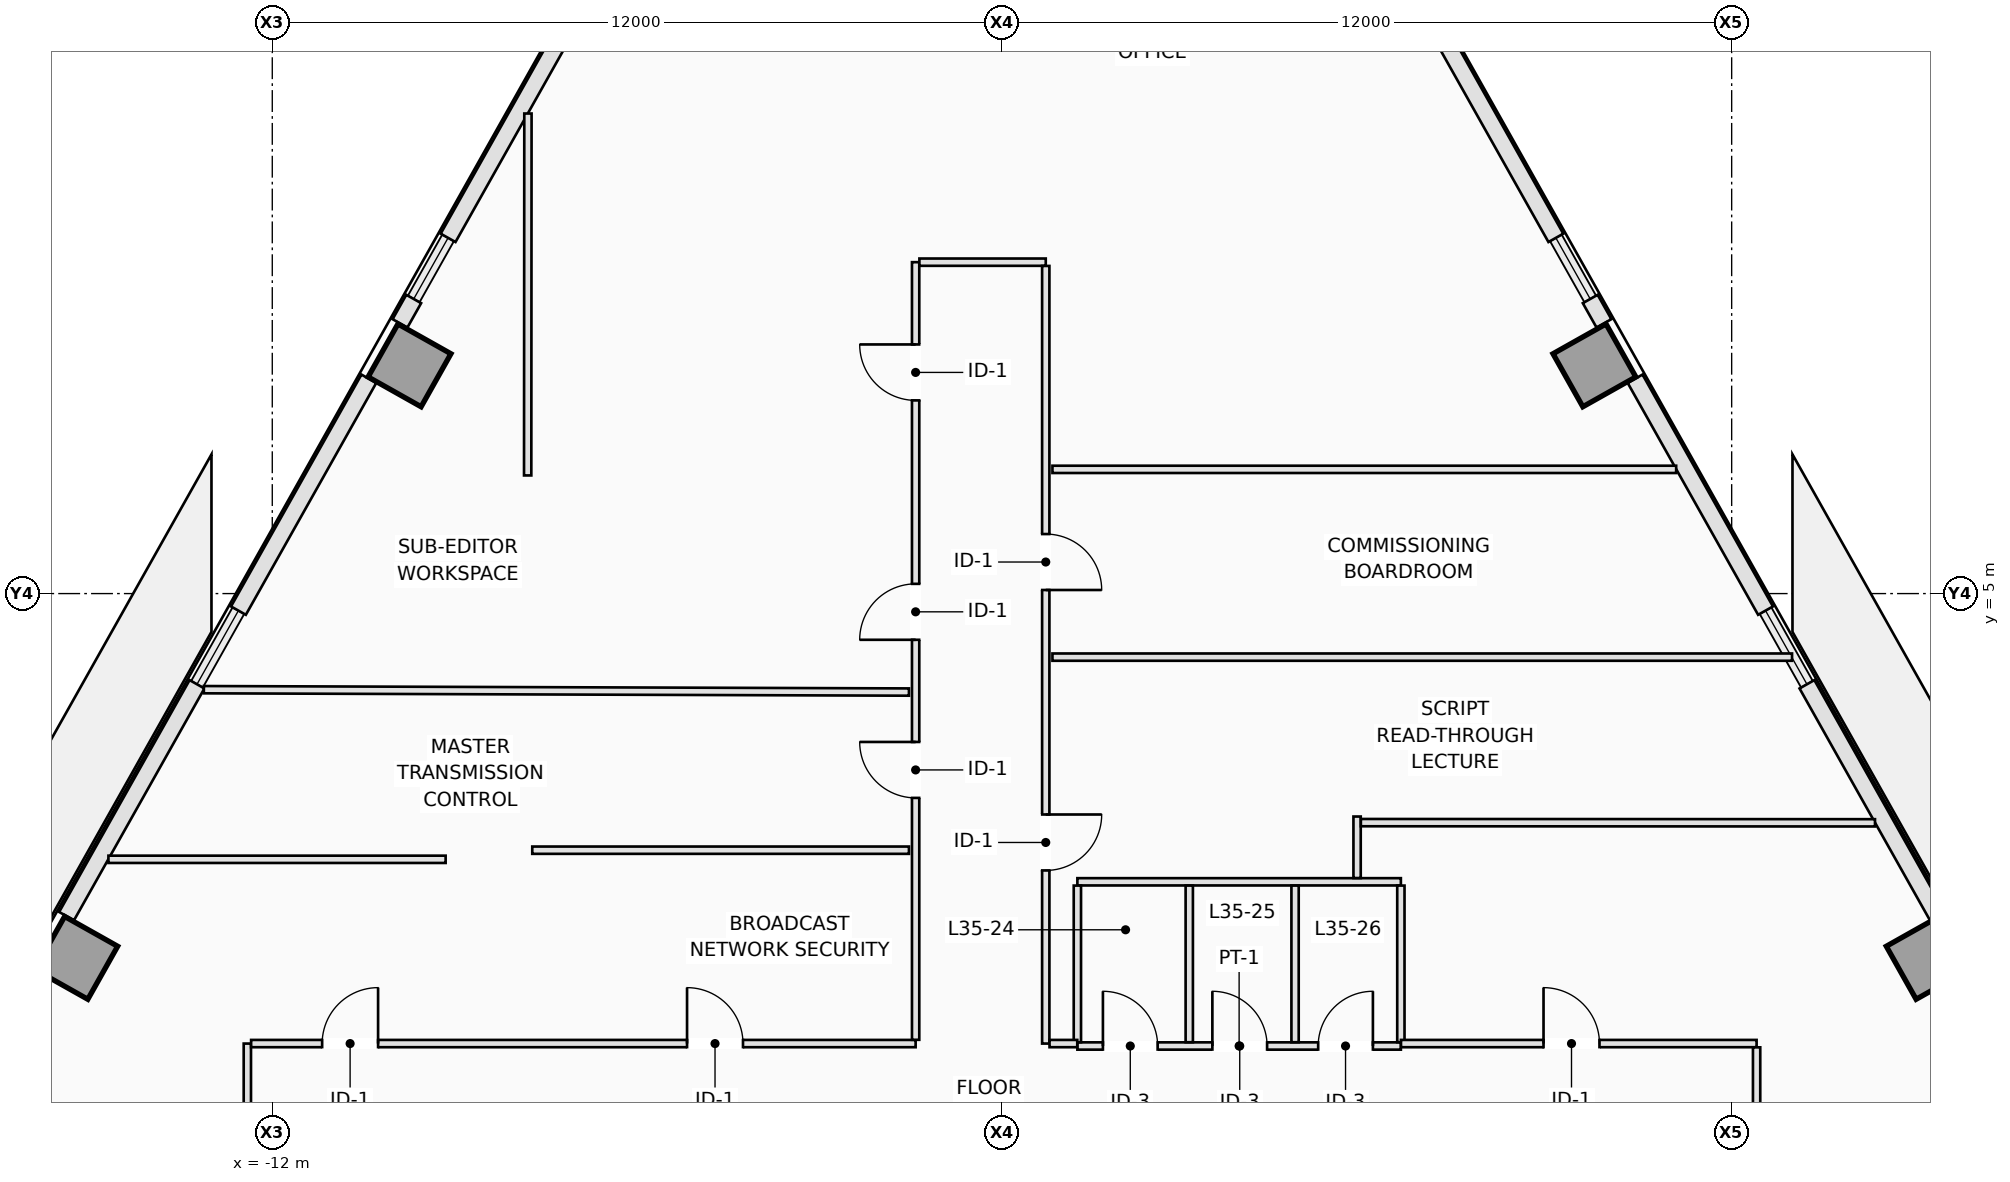
"""IFC4 building model, lengths in metres.
Left out: names, types, materials, properties, quantities, classifications, styles, units other than length and angle.
Written with IfcOpenShell. Run it as: python <this file> out.ifc"""

import sys

from ifc_helpers import new_model, si_unit, direction, frame, frame_2d, origin, origin_2d, place, context, subcontext, project, spatial, rectangle, extrude, element, fill, save


model = new_model("IFC4")
c1 = context("Model", 3, precision=1e-05, world=origin(), true_north=direction((0.0, 1.0)))
c2 = subcontext(c1, "Body", "Model", "MODEL_VIEW")
j1 = project(units=[si_unit("LENGTHUNIT", "METRE"), si_unit("PLANEANGLEUNIT", "RADIAN")], contexts=[c1])
p1 = place(None, origin())
s1 = spatial("IfcSite", under=j1, at=p1, CompositionType="ELEMENT")
p2 = place(p1, origin())
s2 = spatial("IfcBuilding", under=s1, at=p2, CompositionType="ELEMENT")
p3 = place(p2, frame((0.0, 0.0, 130.0)))
s3 = spatial("IfcBuildingStorey", under=s2, at=p3, CompositionType="ELEMENT", Elevation=130.0)
for number, where, z_axis, x_axis in (
    (1, (15.224, -0.991, 0.0), (0.0, 0.0, 1.0), (0.872, 0.49, 0.0)),
    (2, (9.743, 8.753, 0.0), (0.0, 0.0, 1.0), (0.872, 0.49, 0.0)),
    (3, (-9.743, 8.753, 0.0), (0.0, 0.0, 1.0), (-0.872, 0.49, 0.0)),
    (4, (-15.224, -0.991, 0.0), (0.0, 0.0, 1.0), (-0.872, 0.49, 0.0)),
):
    element("IfcColumn", number, at=place(p3, frame(where, z_axis=z_axis, x_axis=x_axis)), inside=s3, PredefinedType="COLUMN", context=c2, shape_type="SweptSolid", body=[
        extrude(rectangle(XDim=1.0, YDim=1.0, at=origin_2d()), origin(), (0.0, 0.0, 1.0), 3.5),
    ])
p4 = place(p3, frame((6.342, 15.768, 0.0), z_axis=(0.0, 0.0, 1.0), x_axis=(0.490289995219, -0.871559361483, 0.0)))
e5 = element("IfcWall", 5, at=p4, inside=s3, PredefinedType="STANDARD", context=c2, shape_type="SweptSolid", body=[
    extrude(rectangle(XDim=5.643, YDim=0.28, at=frame_2d((2.822, 0.0))), origin(), (0.0, 0.0, 1.0), 3.25),
])
p5 = place(p3, frame((9.674, 9.845, 0.0), z_axis=(0.0, 0.0, 1.0), x_axis=(0.490412424957, -0.871490478116, 0.0)))
e6 = element("IfcWall", 6, at=p5, inside=s3, PredefinedType="STANDARD", context=c2, shape_type="SweptSolid", body=[
    extrude(rectangle(XDim=0.46, YDim=0.28, at=frame_2d((0.23, 0.0))), origin(), (0.0, 0.0, 1.0), 3.25),
])
p6 = place(p3, frame((10.412, 8.533, 0.0), z_axis=(0.0, 0.0, 1.0), x_axis=(0.490274486291, -0.871568085747, 0.0)))
e7 = element("IfcWall", 7, at=p6, inside=s3, PredefinedType="STANDARD", context=c2, shape_type="SweptSolid", body=[
    extrude(rectangle(XDim=4.375, YDim=0.28, at=frame_2d((2.188, 0.0))), origin(), (0.0, 0.0, 1.0), 3.25),
])
p7 = place(p3, frame((13.238, 3.509, 0.0), z_axis=(0.0, 0.0, 1.0), x_axis=(0.490232095789, -0.871591929895, 0.0)))
e8 = element("IfcWall", 8, at=p7, inside=s3, PredefinedType="STANDARD", context=c2, shape_type="SweptSolid", body=[
    extrude(rectangle(XDim=4.375, YDim=0.28, at=frame_2d((2.188, 0.0))), origin(), (0.0, 0.0, 1.0), 3.25),
])
p8 = place(p3, frame((-9.9, 9.444, 0.0), z_axis=(0.0, 0.0, 1.0), x_axis=(0.490412424957, 0.871490478116, 0.0)))
e9 = element("IfcWall", 9, at=p8, inside=s3, PredefinedType="STANDARD", context=c2, shape_type="SweptSolid", body=[
    extrude(rectangle(XDim=0.46, YDim=0.28, at=frame_2d((0.23, 0.0))), origin(), (0.0, 0.0, 1.0), 3.25),
])
p9 = place(p3, frame((-9.109, 10.85, 0.0), z_axis=(0.0, 0.0, 1.0), x_axis=(0.490289995219, 0.871559361483, 0.0)))
e10 = element("IfcWall", 10, at=p9, inside=s3, PredefinedType="STANDARD", context=c2, shape_type="SweptSolid", body=[
    extrude(rectangle(XDim=5.643, YDim=0.28, at=frame_2d((2.822, 0.0))), origin(), (0.0, 0.0, 1.0), 3.25),
])
p10 = place(p3, frame((-15.383, -0.305, 0.0), z_axis=(0.0, 0.0, 1.0), x_axis=(0.490232095789, 0.871591929895, 0.0)))
e11 = element("IfcWall", 11, at=p10, inside=s3, PredefinedType="STANDARD", context=c2, shape_type="SweptSolid", body=[
    extrude(rectangle(XDim=4.375, YDim=0.28, at=frame_2d((2.188, 0.0))), origin(), (0.0, 0.0, 1.0), 3.25),
])
p11 = place(p3, frame((-12.557, 4.72, 0.0), z_axis=(0.0, 0.0, 1.0), x_axis=(0.490274486291, 0.871568085747, 0.0)))
e12 = element("IfcWall", 12, at=p11, inside=s3, PredefinedType="STANDARD", context=c2, shape_type="SweptSolid", body=[
    extrude(rectangle(XDim=4.375, YDim=0.28, at=frame_2d((2.188, 0.0))), origin(), (0.0, 0.0, 1.0), 3.25),
])
p12 = place(p3, frame((1.24, -2.44, 0.0), z_axis=(0.0, 0.0, 1.0), x_axis=(1.0, 0.0, 0.0)))
e13 = element("IfcWall", 13, at=p12, inside=s3, PredefinedType="PARTITIONING", context=c2, shape_type="SweptSolid", body=[
    extrude(rectangle(XDim=5.32, YDim=0.12, at=frame_2d((2.66, 0.0))), origin(), (0.0, 0.0, 1.0), 2.891),
])
p13 = place(p12, frame((0.42, 0.0, 0.0)))
e14 = element("IfcOpeningElement", 14, at=p13, cuts=e13, PredefinedType="OPENING", context=c2, shape_type="SweptSolid", body=[
    extrude(rectangle(XDim=0.9, YDim=2.12, at=frame_2d((0.45, 1.06))), frame((0.0, 0.07, 0.0), z_axis=(0.0, -1.0, 0.0), x_axis=(1.0, 0.0, 0.0)), (0.0, 0.0, 1.0), 0.14),
])
p14 = place(p12, frame((2.22, 0.0, 0.0)))
e15 = element("IfcOpeningElement", 15, at=p14, cuts=e13, PredefinedType="OPENING", context=c2, shape_type="SweptSolid", body=[
    extrude(rectangle(XDim=0.9, YDim=2.12, at=frame_2d((0.45, 1.06))), frame((0.0, 0.07, 0.0), z_axis=(0.0, -1.0, 0.0), x_axis=(1.0, 0.0, 0.0)), (0.0, 0.0, 1.0), 0.14),
])
p15 = place(p12, frame((3.96, 0.0, 0.0)))
e16 = element("IfcOpeningElement", 16, at=p15, cuts=e13, PredefinedType="OPENING", context=c2, shape_type="SweptSolid", body=[
    extrude(rectangle(XDim=0.9, YDim=2.12, at=frame_2d((0.45, 1.06))), frame((0.0, 0.07, 0.0), z_axis=(0.0, -1.0, 0.0), x_axis=(1.0, 0.0, 0.0)), (0.0, 0.0, 1.0), 0.14),
])
p16 = place(p3, frame((1.24, 0.26, 0.0), z_axis=(0.0, 0.0, 1.0), x_axis=(1.0, 0.0, 0.0)))
e17 = element("IfcWall", 17, at=p16, inside=s3, PredefinedType="PARTITIONING", context=c2, shape_type="SweptSolid", body=[
    extrude(rectangle(XDim=5.32, YDim=0.12, at=frame_2d((2.66, 0.0))), origin(), (0.0, 0.0, 1.0), 3.25),
])
for number, where, z_axis, x_axis in (
    (18, (1.24, -2.378, 0.0), (0.0, 0.0, 1.0), (0.0, 1.0, 0.0)),
    (19, (3.08, -2.378, 0.0), (0.0, 0.0, 1.0), (0.0, 1.0, 0.0)),
    (20, (4.82, -2.378, 0.0), (0.0, 0.0, 1.0), (0.0, 1.0, 0.0)),
    (21, (6.56, -2.378, 0.0), (0.0, 0.0, 1.0), (0.0, 1.0, 0.0)),
):
    element("IfcWall", number, at=place(p3, frame(where, z_axis=z_axis, x_axis=x_axis)), inside=s3, PredefinedType="PARTITIONING", context=c2, shape_type="SweptSolid", body=[
        extrude(rectangle(XDim=2.576, YDim=0.12, at=frame_2d((1.288, 0.0))), origin(), (0.0, 0.0, 1.0), 3.25),
    ])
p17 = place(p3, frame((-12.41, -4.248, 0.0), z_axis=(0.0, 0.0, 1.0), x_axis=(0.0, 1.0, 0.0)))
e22 = element("IfcWall", 22, at=p17, inside=s3, PredefinedType="PARTITIONING", context=c2, shape_type="SweptSolid", body=[
    extrude(rectangle(XDim=1.848, YDim=0.12, at=frame_2d((0.924, 0.0))), origin(), (0.0, 0.0, 1.0), 3.25),
])
p18 = place(p3, frame((-12.348, -2.4, 0.0), z_axis=(0.0, 0.0, 1.0), x_axis=(1.0, 0.0, 0.0)))
e23 = element("IfcWall", 23, at=p18, inside=s3, PredefinedType="PARTITIONING", context=c2, shape_type="SweptSolid", body=[
    extrude(rectangle(XDim=10.928, YDim=0.12, at=frame_2d((5.464, 0.0))), origin(), (0.0, 0.0, 1.0), 2.891),
])
p19 = place(p18, frame((7.169, 0.0, 0.0)))
e24 = element("IfcOpeningElement", 24, at=p19, cuts=e23, PredefinedType="OPENING", context=c2, shape_type="SweptSolid", body=[
    extrude(rectangle(XDim=0.92, YDim=2.12, at=frame_2d((0.46, 1.06))), frame((0.0, 0.07, 0.0), z_axis=(0.0, -1.0, 0.0), x_axis=(1.0, 0.0, 0.0)), (0.0, 0.0, 1.0), 0.14),
])
p20 = place(p18, frame((1.168, 0.0, 0.0)))
e25 = element("IfcOpeningElement", 25, at=p20, cuts=e23, PredefinedType="OPENING", context=c2, shape_type="SweptSolid", body=[
    extrude(rectangle(XDim=0.92, YDim=2.12, at=frame_2d((0.46, 1.06))), frame((0.0, 0.07, 0.0), z_axis=(0.0, -1.0, 0.0), x_axis=(1.0, 0.0, 0.0)), (0.0, 0.0, 1.0), 0.14),
])
p21 = place(p3, frame((-1.42, -2.338, 0.0), z_axis=(0.0, 0.0, 1.0), x_axis=(0.0, 1.0, 0.0)))
e26 = element("IfcWall", 26, at=p21, inside=s3, PredefinedType="PARTITIONING", context=c2, shape_type="SweptSolid", body=[
    extrude(rectangle(XDim=12.788, YDim=0.12, at=frame_2d((6.394, 0.0))), origin(), (0.0, 0.0, 1.0), 3.25),
])
p22 = place(p21, frame((10.515, 0.0, 0.0)))
e27 = element("IfcOpeningElement", 27, at=p22, cuts=e26, PredefinedType="OPENING", context=c2, shape_type="SweptSolid", body=[
    extrude(rectangle(XDim=0.92, YDim=2.12, at=frame_2d((0.46, 1.06))), frame((0.0, 0.07, 0.0), z_axis=(0.0, -1.0, 0.0), x_axis=(1.0, 0.0, 0.0)), (0.0, 0.0, 1.0), 0.14),
])
p23 = place(p21, frame((6.578, 0.0, 0.0)))
e28 = element("IfcOpeningElement", 28, at=p23, cuts=e26, PredefinedType="OPENING", context=c2, shape_type="SweptSolid", body=[
    extrude(rectangle(XDim=0.92, YDim=2.12, at=frame_2d((0.46, 1.06))), frame((0.0, 0.07, 0.0), z_axis=(0.0, -1.0, 0.0), x_axis=(1.0, 0.0, 0.0)), (0.0, 0.0, 1.0), 0.14),
])
p24 = place(p21, frame((3.978, 0.0, 0.0)))
e29 = element("IfcOpeningElement", 29, at=p24, cuts=e26, PredefinedType="OPENING", context=c2, shape_type="SweptSolid", body=[
    extrude(rectangle(XDim=0.92, YDim=2.12, at=frame_2d((0.46, 1.06))), frame((0.0, 0.07, 0.0), z_axis=(0.0, -1.0, 0.0), x_axis=(1.0, 0.0, 0.0)), (0.0, 0.0, 1.0), 0.14),
])
p25 = place(p3, frame((-1.358, 10.45, 0.0), z_axis=(0.0, 0.0, 1.0), x_axis=(1.0, 0.0, 0.0)))
e30 = element("IfcWall", 30, at=p25, inside=s3, PredefinedType="PARTITIONING", context=c2, shape_type="SweptSolid", body=[
    extrude(rectangle(XDim=2.078, YDim=0.12, at=frame_2d((1.039, 0.0))), origin(), (0.0, 0.0, 1.0), 3.25),
])
p26 = place(p3, frame((0.72, 10.388, 0.0), z_axis=(0.0, 0.0, 1.0), x_axis=(0.0, -1.0, 0.0)))
e31 = element("IfcWall", 31, at=p26, inside=s3, PredefinedType="PARTITIONING", context=c2, shape_type="SweptSolid", body=[
    extrude(rectangle(XDim=12.788, YDim=0.12, at=frame_2d((6.394, 0.0))), origin(), (0.0, 0.0, 1.0), 3.25),
])
p27 = place(p26, frame((4.409, 0.0, 0.0)))
e32 = element("IfcOpeningElement", 32, at=p27, cuts=e31, PredefinedType="OPENING", context=c2, shape_type="SweptSolid", body=[
    extrude(rectangle(XDim=0.92, YDim=2.12, at=frame_2d((0.46, 1.06))), frame((0.0, 0.07, 0.0), z_axis=(0.0, -1.0, 0.0), x_axis=(1.0, 0.0, 0.0)), (0.0, 0.0, 1.0), 0.14),
])
p28 = place(p26, frame((9.021, 0.0, 0.0)))
e33 = element("IfcOpeningElement", 33, at=p28, cuts=e31, PredefinedType="OPENING", context=c2, shape_type="SweptSolid", body=[
    extrude(rectangle(XDim=0.92, YDim=2.12, at=frame_2d((0.46, 1.06))), frame((0.0, 0.07, 0.0), z_axis=(0.0, -1.0, 0.0), x_axis=(1.0, 0.0, 0.0)), (0.0, 0.0, 1.0), 0.14),
])
p29 = place(p3, frame((0.782, -2.4, 0.0), z_axis=(0.0, 0.0, 1.0), x_axis=(1.0, 0.0, 0.0)))
e34 = element("IfcWall", 34, at=p29, inside=s3, PredefinedType="PARTITIONING", context=c2, shape_type="SweptSolid", body=[
    extrude(rectangle(XDim=0.456, YDim=0.12, at=frame_2d((0.228, 0.0))), origin(), (0.0, 0.0, 1.0), 2.891),
])
p30 = place(p3, frame((6.562, -2.4, 0.0), z_axis=(0.0, 0.0, 1.0), x_axis=(1.0, 0.0, 0.0)))
e35 = element("IfcWall", 35, at=p30, inside=s3, PredefinedType="PARTITIONING", context=c2, shape_type="SweptSolid", body=[
    extrude(rectangle(XDim=5.848, YDim=0.12, at=frame_2d((2.924, 0.0))), origin(), (0.0, 0.0, 1.0), 3.25),
])
p31 = place(p30, frame((2.344, 0.0, 0.0)))
e36 = element("IfcOpeningElement", 36, at=p31, cuts=e35, PredefinedType="OPENING", context=c2, shape_type="SweptSolid", body=[
    extrude(rectangle(XDim=0.92, YDim=2.12, at=frame_2d((0.46, 1.06))), frame((0.0, 0.07, 0.0), z_axis=(0.0, -1.0, 0.0), x_axis=(1.0, 0.0, 0.0)), (0.0, 0.0, 1.0), 0.14),
])
p32 = place(p3, frame((12.41, -2.462, 0.0), z_axis=(0.0, 0.0, 1.0), x_axis=(0.0, -1.0, 0.0)))
e37 = element("IfcWall", 37, at=p32, inside=s3, PredefinedType="PARTITIONING", context=c2, shape_type="SweptSolid", body=[
    extrude(rectangle(XDim=1.786, YDim=0.12, at=frame_2d((0.893, 0.0))), origin(), (0.0, 0.0, 1.0), 3.25),
])
p33 = place(p3, frame((-7.8, 6.943, 0.0), z_axis=(0.0, 0.0, 1.0), x_axis=(0.000738370461, 0.999999727404, 0.0)))
e38 = element("IfcWall", 38, at=p33, inside=s3, PredefinedType="PARTITIONING", context=c2, shape_type="SweptSolid", body=[
    extrude(rectangle(XDim=5.952, YDim=0.12, at=frame_2d((2.976, 0.0))), origin(), (0.0, 0.0, 1.0), 3.25),
])
p34 = place(p3, frame((11.087, 7.043, 0.0), z_axis=(0.0, 0.0, 1.0), x_axis=(-1.0, 0.0, 0.0)))
e39 = element("IfcWall", 39, at=p34, inside=s3, PredefinedType="PARTITIONING", context=c2, shape_type="SweptSolid", body=[
    extrude(rectangle(XDim=10.257, YDim=0.12, at=frame_2d((5.128, 0.0))), origin(), (0.0, 0.0, 1.0), 3.25),
])
p35 = place(p3, frame((-1.53, 3.381, 0.0), z_axis=(0.0, 0.0, 1.0), x_axis=(-0.999994325485, 0.003368827475, 0.0)))
e40 = element("IfcWall", 40, at=p35, inside=s3, PredefinedType="PARTITIONING", context=c2, shape_type="SweptSolid", body=[
    extrude(rectangle(XDim=11.595, YDim=0.12, at=frame_2d((5.798, 0.0))), origin(), (0.0, 0.0, 1.0), 2.891),
])
p36 = place(p3, frame((12.993, 3.955, 0.0), z_axis=(0.0, 0.0, 1.0), x_axis=(-1.0, 0.0, 0.0)))
e41 = element("IfcWall", 41, at=p36, inside=s3, PredefinedType="PARTITIONING", context=c2, shape_type="SweptSolid", body=[
    extrude(rectangle(XDim=12.163, YDim=0.12, at=frame_2d((6.082, 0.0))), origin(), (0.0, 0.0, 1.0), 3.25),
])
p37 = place(p3, frame((5.84, 1.333, 0.0), z_axis=(0.0, 0.0, 1.0), x_axis=(0.0, -1.0, 0.0)))
e42 = element("IfcWall", 42, at=p37, inside=s3, PredefinedType="PARTITIONING", context=c2, shape_type="SweptSolid", body=[
    extrude(rectangle(XDim=1.011, YDim=0.12, at=frame_2d((0.506, 0.0))), origin(), (0.0, 0.0, 1.0), 3.25),
])
p38 = place(p3, frame((14.357, 1.23, 0.0), z_axis=(0.0, 0.0, 1.0), x_axis=(-0.999999918286, 0.000404262044, 0.0)))
e43 = element("IfcWall", 43, at=p38, inside=s3, PredefinedType="PARTITIONING", context=c2, shape_type="SweptSolid", body=[
    extrude(rectangle(XDim=8.455, YDim=0.12, at=frame_2d((4.228, 0.0))), origin(), (0.0, 0.0, 1.0), 3.25),
])
p39 = place(p3, frame((-1.53, 0.78, 0.0), z_axis=(0.0, 0.0, 1.0), x_axis=(-1.0, 0.0, 0.0)))
e44 = element("IfcWall", 44, at=p39, inside=s3, PredefinedType="PARTITIONING", context=c2, shape_type="SweptSolid", body=[
    extrude(rectangle(XDim=6.195, YDim=0.12, at=frame_2d((3.097, 0.0))), origin(), (0.0, 0.0, 1.0), 3.25),
])
p40 = place(p3, frame((-9.149, 0.63, 0.0), z_axis=(0.0, 0.0, 1.0), x_axis=(-1.0, 0.0, 0.0)))
e45 = element("IfcWall", 45, at=p40, inside=s3, PredefinedType="PARTITIONING", context=c2, shape_type="SweptSolid", body=[
    extrude(rectangle(XDim=5.545, YDim=0.12, at=frame_2d((2.773, 0.0))), origin(), (0.0, 0.0, 1.0), 3.25),
])
p41 = place(p13, origin())
e46 = element("IfcDoor", 46, at=p41, inside=s3, OperationType="SINGLE_SWING_LEFT", PredefinedType="DOOR", context=c2, shape_type="SweptSolid", body=[
    extrude(rectangle(XDim=0.9, YDim=2.12, at=frame_2d((0.45, 1.06))), frame((0.0, 0.025, 0.0), z_axis=(0.0, -1.0, 0.0), x_axis=(1.0, 0.0, 0.0)), (0.0, 0.0, 1.0), 0.05),
])
fill(e14, e46)
p42 = place(p14, origin())
e47 = element("IfcDoor", 47, at=p42, inside=s3, OperationType="SINGLE_SWING_LEFT", PredefinedType="DOOR", context=c2, shape_type="SweptSolid", body=[
    extrude(rectangle(XDim=0.9, YDim=2.12, at=frame_2d((0.45, 1.06))), frame((0.0, 0.025, 0.0), z_axis=(0.0, -1.0, 0.0), x_axis=(1.0, 0.0, 0.0)), (0.0, 0.0, 1.0), 0.05),
])
fill(e15, e47)
p43 = place(p15, origin())
e48 = element("IfcDoor", 48, at=p43, inside=s3, OperationType="SINGLE_SWING_RIGHT", PredefinedType="DOOR", context=c2, shape_type="SweptSolid", body=[
    extrude(rectangle(XDim=0.9, YDim=2.12, at=frame_2d((0.45, 1.06))), frame((0.0, 0.025, 0.0), z_axis=(0.0, -1.0, 0.0), x_axis=(1.0, 0.0, 0.0)), (0.0, 0.0, 1.0), 0.05),
])
fill(e16, e48)
p44 = place(p22, origin())
e49 = element("IfcDoor", 49, at=p44, inside=s3, OperationType="SINGLE_SWING_RIGHT", PredefinedType="DOOR", context=c2, shape_type="SweptSolid", body=[
    extrude(rectangle(XDim=0.92, YDim=2.12, at=frame_2d((0.46, 1.06))), frame((0.0, 0.025, 0.0), z_axis=(0.0, -1.0, 0.0), x_axis=(1.0, 0.0, 0.0)), (0.0, 0.0, 1.0), 0.05),
])
fill(e27, e49)
p45 = place(p23, origin())
e50 = element("IfcDoor", 50, at=p45, inside=s3, OperationType="SINGLE_SWING_LEFT", PredefinedType="DOOR", context=c2, shape_type="SweptSolid", body=[
    extrude(rectangle(XDim=0.92, YDim=2.12, at=frame_2d((0.46, 1.06))), frame((0.0, 0.025, 0.0), z_axis=(0.0, -1.0, 0.0), x_axis=(1.0, 0.0, 0.0)), (0.0, 0.0, 1.0), 0.05),
])
fill(e28, e50)
p46 = place(p27, origin())
e51 = element("IfcDoor", 51, at=p46, inside=s3, OperationType="SINGLE_SWING_RIGHT", PredefinedType="DOOR", context=c2, shape_type="SweptSolid", body=[
    extrude(rectangle(XDim=0.92, YDim=2.12, at=frame_2d((0.46, 1.06))), frame((0.0, 0.025, 0.0), z_axis=(0.0, -1.0, 0.0), x_axis=(1.0, 0.0, 0.0)), (0.0, 0.0, 1.0), 0.05),
])
fill(e32, e51)
p47 = place(p28, origin())
e52 = element("IfcDoor", 52, at=p47, inside=s3, OperationType="SINGLE_SWING_LEFT", PredefinedType="DOOR", context=c2, shape_type="SweptSolid", body=[
    extrude(rectangle(XDim=0.92, YDim=2.12, at=frame_2d((0.46, 1.06))), frame((0.0, 0.025, 0.0), z_axis=(0.0, -1.0, 0.0), x_axis=(1.0, 0.0, 0.0)), (0.0, 0.0, 1.0), 0.05),
])
fill(e33, e52)
p48 = place(p24, origin())
e53 = element("IfcDoor", 53, at=p48, inside=s3, OperationType="SINGLE_SWING_RIGHT", PredefinedType="DOOR", context=c2, shape_type="SweptSolid", body=[
    extrude(rectangle(XDim=0.92, YDim=2.12, at=frame_2d((0.46, 1.06))), frame((0.0, 0.025, 0.0), z_axis=(0.0, -1.0, 0.0), x_axis=(1.0, 0.0, 0.0)), (0.0, 0.0, 1.0), 0.05),
])
fill(e29, e53)
p49 = place(p19, origin())
e54 = element("IfcDoor", 54, at=p49, inside=s3, OperationType="SINGLE_SWING_LEFT", PredefinedType="DOOR", context=c2, shape_type="SweptSolid", body=[
    extrude(rectangle(XDim=0.92, YDim=2.12, at=frame_2d((0.46, 1.06))), frame((0.0, 0.025, 0.0), z_axis=(0.0, -1.0, 0.0), x_axis=(1.0, 0.0, 0.0)), (0.0, 0.0, 1.0), 0.05),
])
fill(e24, e54)
p50 = place(p20, origin())
e55 = element("IfcDoor", 55, at=p50, inside=s3, OperationType="SINGLE_SWING_RIGHT", PredefinedType="DOOR", context=c2, shape_type="SweptSolid", body=[
    extrude(rectangle(XDim=0.92, YDim=2.12, at=frame_2d((0.46, 1.06))), frame((0.0, 0.025, 0.0), z_axis=(0.0, -1.0, 0.0), x_axis=(1.0, 0.0, 0.0)), (0.0, 0.0, 1.0), 0.05),
])
fill(e25, e55)
p51 = place(p31, origin())
e56 = element("IfcDoor", 56, at=p51, inside=s3, OperationType="SINGLE_SWING_LEFT", PredefinedType="DOOR", context=c2, shape_type="SweptSolid", body=[
    extrude(rectangle(XDim=0.92, YDim=2.12, at=frame_2d((0.46, 1.06))), frame((0.0, 0.025, 0.0), z_axis=(0.0, -1.0, 0.0), x_axis=(1.0, 0.0, 0.0)), (0.0, 0.0, 1.0), 0.05),
])
fill(e36, e56)
save(model, sys.argv[1])
